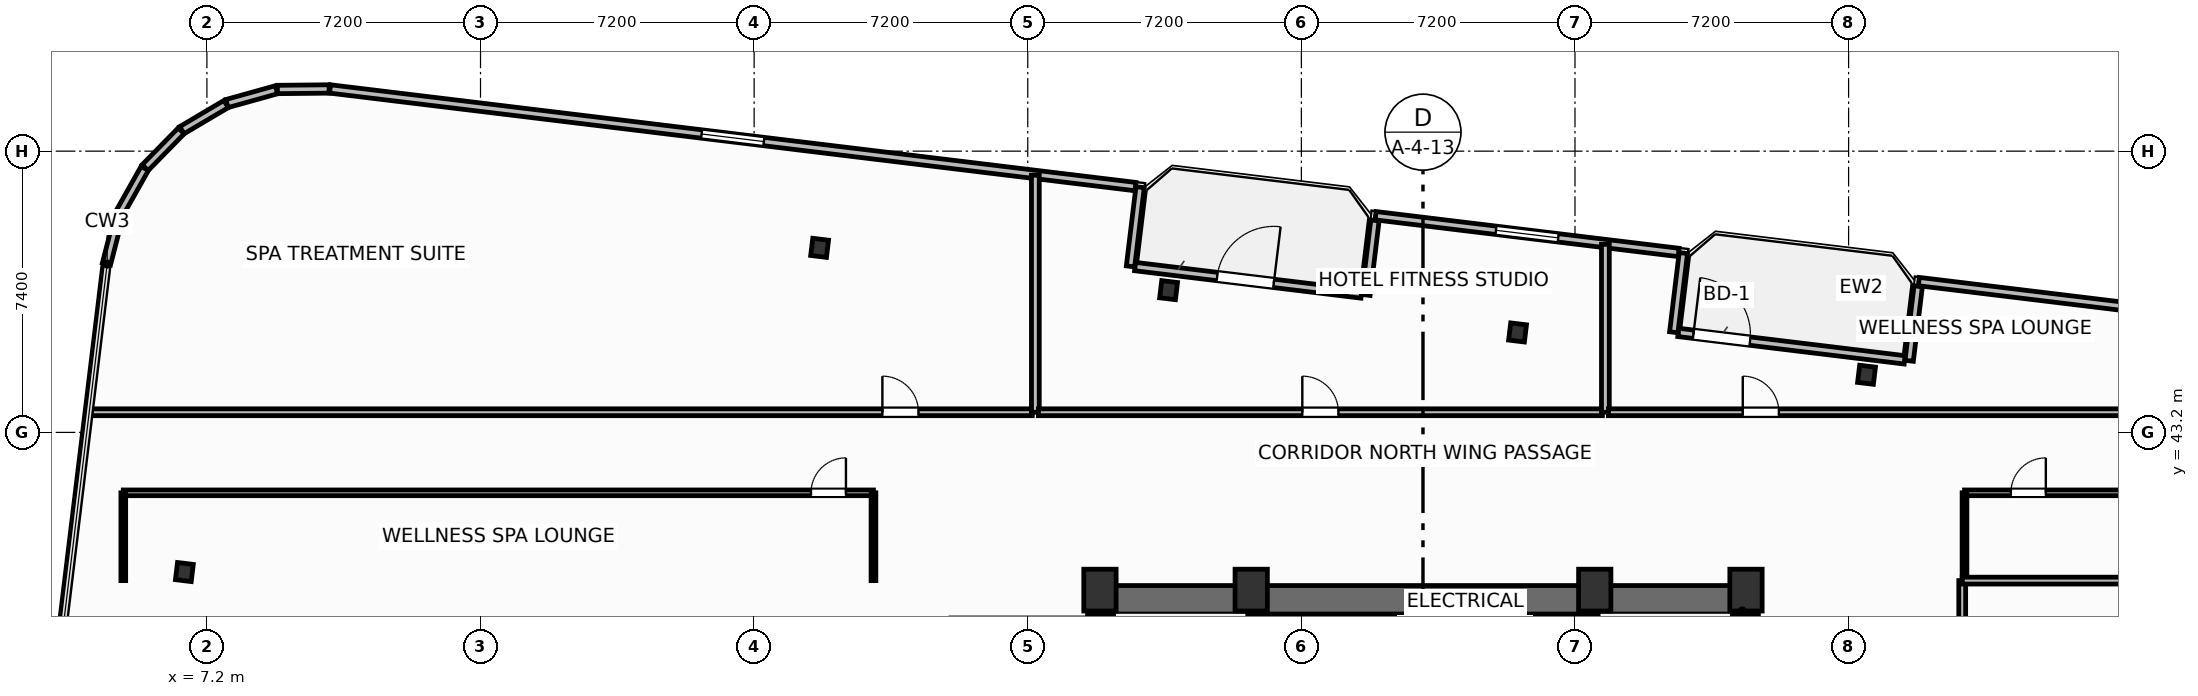
"""IFC4 building model, lengths in metres.
Left out: names, types, materials, properties, quantities, classifications, styles, units other than length and angle.
Written with IfcOpenShell. Run it as: python <this file> out.ifc"""

import sys

from ifc_helpers import new_model, si_unit, direction, frame, frame_2d, origin, origin_2d, place, context, subcontext, project, spatial, rectangle, i_section, extrude, element, fill, save


model = new_model("IFC4")
c1 = context("Model", 3, precision=1e-05, world=origin(), true_north=direction((0.0, 1.0)))
c2 = subcontext(c1, "Body", "Model", "MODEL_VIEW")
j1 = project(units=[si_unit("LENGTHUNIT", "METRE"), si_unit("PLANEANGLEUNIT", "RADIAN")], contexts=[c1])
p1 = place(None, origin())
s1 = spatial("IfcSite", under=j1, at=p1, CompositionType="ELEMENT")
p2 = place(p1, origin())
s2 = spatial("IfcBuilding", under=s1, at=p2, CompositionType="ELEMENT")
p3 = place(p2, frame((0.0, 0.0, 155.0)))
s3 = spatial("IfcBuildingStorey", under=s2, at=p3, CompositionType="ELEMENT", Elevation=155.0)
for number, where, z_axis, x_axis in (
    (1, (30.7, 39.05, 0.0), (0.0, 0.0, 1.0), (1.0, 0.0, 0.0)),
    (2, (34.68, 39.05, 0.0), (0.0, 0.0, 1.0), (1.0, 0.0, 0.0)),
    (3, (43.72, 39.05, 0.0), (0.0, 0.0, 1.0), (1.0, 0.0, 0.0)),
    (4, (47.7, 39.05, 0.0), (0.0, 0.0, 1.0), (1.0, 0.0, 0.0)),
):
    element("IfcColumn", number, at=place(p3, frame(where, z_axis=z_axis, x_axis=x_axis)), inside=s3, PredefinedType="COLUMN", context=c2, shape_type="SweptSolid", body=[
        extrude(rectangle(XDim=0.85, YDim=1.1, at=origin_2d()), origin(), (0.0, 0.0, 1.0), 3.7),
    ])
p4 = place(p3, frame((30.38, 38.795, 0.0), z_axis=(0.0, 0.0, 1.0), x_axis=(1.0, 0.0, 0.0)))
e5 = element("IfcWall", 5, at=p4, inside=s3, PredefinedType="SHEAR", context=c2, shape_type="SweptSolid", body=[
    extrude(rectangle(XDim=17.64, YDim=0.75, at=frame_2d((8.82, 0.0))), origin(), (0.0, 0.0, 1.0), 3.45),
])
for number, where, z_axis, x_axis in (
    (6, (30.755, 29.2, 0.0), (0.0, 0.0, 1.0), (0.0, 1.0, 0.0)),
    (7, (47.645, 29.2, 0.0), (0.0, 0.0, 1.0), (0.0, 1.0, 0.0)),
):
    element("IfcWall", number, at=place(p3, frame(where, z_axis=z_axis, x_axis=x_axis)), inside=s3, PredefinedType="SHEAR", context=c2, shape_type="SweptSolid", body=[
        extrude(rectangle(XDim=9.22, YDim=0.75, at=frame_2d((4.61, 0.0))), origin(), (0.0, 0.0, 1.0), 3.45),
    ])
p5 = place(p3, frame((34.64, 29.2, 0.0), z_axis=(0.0, 0.0, 1.0), x_axis=(0.0, 1.0, 0.0)))
e8 = element("IfcWall", 8, at=p5, inside=s3, PredefinedType="SHEAR", context=c2, shape_type="SweptSolid", body=[
    extrude(rectangle(XDim=9.22, YDim=0.25, at=frame_2d((4.61, 0.0))), origin(), (0.0, 0.0, 1.0), 3.45),
])
p6 = place(p5, frame((0.65, 0.0, 0.0)))
e9 = element("IfcOpeningElement", 9, at=p6, cuts=e8, PredefinedType="OPENING", context=c2, shape_type="SweptSolid", body=[
    extrude(rectangle(XDim=1.05, YDim=2.15, at=frame_2d((0.525, 1.075))), frame((0.0, 0.135, 0.0), z_axis=(0.0, -1.0, 0.0), x_axis=(1.0, 0.0, 0.0)), (0.0, 0.0, 1.0), 0.27),
])
p7 = place(p3, frame((43.76, 29.2, 0.0), z_axis=(0.0, 0.0, 1.0), x_axis=(0.0, 1.0, 0.0)))
e10 = element("IfcWall", 10, at=p7, inside=s3, PredefinedType="SHEAR", context=c2, shape_type="SweptSolid", body=[
    extrude(rectangle(XDim=9.22, YDim=0.25, at=frame_2d((4.61, 0.0))), origin(), (0.0, 0.0, 1.0), 3.45),
])
p8 = place(p7, frame((0.65, 0.0, 0.0)))
e11 = element("IfcOpeningElement", 11, at=p8, cuts=e10, PredefinedType="OPENING", context=c2, shape_type="SweptSolid", body=[
    extrude(rectangle(XDim=1.05, YDim=2.15, at=frame_2d((0.525, 1.075))), frame((0.0, 0.135, 0.0), z_axis=(0.0, -1.0, 0.0), x_axis=(1.0, 0.0, 0.0)), (0.0, 0.0, 1.0), 0.27),
])
for number, where, z_axis, x_axis in (
    (12, (50.872, 44.717, 0.0), (0.0, 0.0, 1.0), (0.993, -0.12, 0.0)),
    (13, (41.689, 45.83, 0.0), (0.0, 0.0, 1.0), (0.993, -0.12, 0.0)),
    (14, (32.506, 46.943, 0.0), (0.0, 0.0, 1.0), (0.993, -0.12, 0.0)),
    (15, (23.323, 48.056, 0.0), (0.0, 0.0, 1.0), (0.993, -0.12, 0.0)),
    (16, (6.607, 39.526, 0.0), (0.0, 0.0, 1.0), (0.993, -0.12, 0.0)),
):
    element("IfcColumn", number, at=place(p3, frame(where, z_axis=z_axis, x_axis=x_axis)), inside=s3, PredefinedType="COLUMN", context=c2, shape_type="SweptSolid", body=[
        extrude(i_section(OverallWidth=0.418, OverallDepth=0.455, WebThickness=0.042, FlangeThickness=0.068, FilletRadius=0.025, at=origin_2d()), origin(), (0.0, 0.0, 1.0), 3.7),
    ])
p9 = place(p3, frame((31.624, 47.563, 0.0), z_axis=(0.0, 0.0, 1.0), x_axis=(0.992729951822, -0.120362962556, 0.0)))
e17 = element("IfcWall", 17, at=p9, inside=s3, PredefinedType="SOLIDWALL", context=c2, shape_type="SweptSolid", body=[
    extrude(rectangle(XDim=6.0, YDim=0.22, at=frame_2d((3.0, 0.0))), origin(), (0.0, 0.0, 1.0), 2.73),
])
p10 = place(p9, frame((2.176, 0.0, 0.0)))
e18 = element("IfcOpeningElement", 18, at=p10, cuts=e17, PredefinedType="OPENING", context=c2, shape_type="SweptSolid", body=[
    extrude(rectangle(XDim=1.5, YDim=2.25, at=frame_2d((0.75, 1.125))), frame((0.0, 0.12, 0.0), z_axis=(0.0, -1.0, 0.0), x_axis=(1.0, 0.0, 0.0)), (0.0, 0.0, 1.0), 0.24),
])
p11 = place(p3, frame((45.92, 45.831, 0.0), z_axis=(0.0, 0.0, 1.0), x_axis=(0.992729951822, -0.120362962556, 0.0)))
e19 = element("IfcWall", 19, at=p11, inside=s3, PredefinedType="SOLIDWALL", context=c2, shape_type="SweptSolid", body=[
    extrude(rectangle(XDim=6.0, YDim=0.22, at=frame_2d((3.0, 0.0))), origin(), (0.0, 0.0, 1.0), 2.73),
])
p12 = place(p11, frame((0.4, 0.0, 0.0)))
e20 = element("IfcOpeningElement", 20, at=p12, cuts=e19, PredefinedType="OPENING", context=c2, shape_type="SweptSolid", body=[
    extrude(rectangle(XDim=1.5, YDim=2.25, at=frame_2d((0.75, 1.125))), frame((0.0, 0.12, 0.0), z_axis=(0.0, -1.0, 0.0), x_axis=(1.0, 0.0, 0.0)), (0.0, 0.0, 1.0), 0.24),
])
p13 = place(p3, frame((73.538, 44.588, 0.0), z_axis=(0.0, 0.0, 1.0), x_axis=(-0.992733493583, 0.120333747213, 0.0)))
e21 = element("IfcWall", 21, at=p13, inside=s3, PredefinedType="SOLIDWALL", context=c2, shape_type="SweptSolid", body=[
    extrude(rectangle(XDim=21.447, YDim=0.22, at=frame_2d((10.724, 0.0))), origin(), (0.0, 0.0, 1.0), 2.73),
])
p14 = place(p13, frame((9.899, 0.0, 0.8)))
e22 = element("IfcOpeningElement", 22, at=p14, cuts=e21, PredefinedType="OPENING", context=c2, shape_type="SweptSolid", body=[
    extrude(rectangle(XDim=1.65, YDim=1.65, at=frame_2d((0.825, 0.825))), frame((0.0, 0.12, 0.0), z_axis=(0.0, -1.0, 0.0), x_axis=(1.0, 0.0, 0.0)), (0.0, 0.0, 1.0), 0.24),
])
p15 = place(p3, frame((52.231, 47.045, 0.0), z_axis=(0.0, 0.0, 1.0), x_axis=(-0.120275992932, -0.992740492538, 0.0)))
e23 = element("IfcWall", 23, at=p15, inside=s3, PredefinedType="SOLIDWALL", context=c2, shape_type="SweptSolid", body=[
    extrude(rectangle(XDim=1.975, YDim=0.22, at=frame_2d((0.988, 0.0))), origin(), (0.0, 0.0, 1.0), 2.73),
])
p16 = place(p3, frame((45.799, 45.835, 0.0), z_axis=(0.0, 0.0, 1.0), x_axis=(0.120314009587, 0.992735885871, 0.0)))
e24 = element("IfcWall", 24, at=p16, inside=s3, PredefinedType="SOLIDWALL", context=c2, shape_type="SweptSolid", body=[
    extrude(rectangle(XDim=2.1, YDim=0.22, at=frame_2d((1.05, 0.0))), origin(), (0.0, 0.0, 1.0), 2.73),
])
p17 = place(p3, frame((45.928, 47.935, 0.0), z_axis=(0.0, 0.0, 1.0), x_axis=(-0.992730591876, 0.120357683402, 0.0)))
e25 = element("IfcWall", 25, at=p17, inside=s3, PredefinedType="SOLIDWALL", context=c2, shape_type="SweptSolid", body=[
    extrude(rectangle(XDim=8.035, YDim=0.22, at=frame_2d((4.017, 0.0))), origin(), (0.0, 0.0, 1.0), 2.73),
])
p18 = place(p17, frame((3.192, 0.0, 0.8)))
e26 = element("IfcOpeningElement", 26, at=p18, cuts=e25, PredefinedType="OPENING", context=c2, shape_type="SweptSolid", body=[
    extrude(rectangle(XDim=1.65, YDim=1.65, at=frame_2d((0.825, 0.825))), frame((0.0, 0.12, 0.0), z_axis=(0.0, -1.0, 0.0), x_axis=(1.0, 0.0, 0.0)), (0.0, 0.0, 1.0), 0.24),
])
p19 = place(p3, frame((37.936, 48.778, 0.0), z_axis=(0.0, 0.0, 1.0), x_axis=(-0.120397815541, -0.992725725472, 0.0)))
e27 = element("IfcWall", 27, at=p19, inside=s3, PredefinedType="SOLIDWALL", context=c2, shape_type="SweptSolid", body=[
    extrude(rectangle(XDim=1.975, YDim=0.22, at=frame_2d((0.988, 0.0))), origin(), (0.0, 0.0, 1.0), 2.73),
])
p20 = place(p3, frame((31.504, 47.568, 0.0), z_axis=(0.0, 0.0, 1.0), x_axis=(0.120341784665, 0.992732519294, 0.0)))
e28 = element("IfcWall", 28, at=p20, inside=s3, PredefinedType="SOLIDWALL", context=c2, shape_type="SweptSolid", body=[
    extrude(rectangle(XDim=2.1, YDim=0.22, at=frame_2d((1.05, 0.0))), origin(), (0.0, 0.0, 1.0), 2.73),
])
p21 = place(p3, frame((31.633, 49.668, 0.0), z_axis=(0.0, 0.0, 1.0), x_axis=(-0.992731670483, 0.120348786531, 0.0)))
e29 = element("IfcWall", 29, at=p21, inside=s3, PredefinedType="SOLIDWALL", context=c2, shape_type="SweptSolid", body=[
    extrude(rectangle(XDim=21.347, YDim=0.22, at=frame_2d((10.674, 0.0))), origin(), (0.0, 0.0, 1.0), 2.73),
])
p22 = place(p21, frame((9.849, 0.0, 0.8)))
e30 = element("IfcOpeningElement", 30, at=p22, cuts=e29, PredefinedType="OPENING", context=c2, shape_type="SweptSolid", body=[
    extrude(rectangle(XDim=1.65, YDim=1.65, at=frame_2d((0.825, 0.825))), frame((0.0, 0.12, 0.0), z_axis=(0.0, -1.0, 0.0), x_axis=(1.0, 0.0, 0.0)), (0.0, 0.0, 1.0), 0.24),
])
p23 = place(p3, frame((10.416, 52.237, 0.0), z_axis=(0.0, 0.0, 1.0), x_axis=(-0.999947718056, -0.010225514878, 0.0)))
e31 = element("IfcWall", 31, at=p23, inside=s3, PredefinedType="SOLIDWALL", context=c2, shape_type="SweptSolid", body=[
    extrude(rectangle(XDim=1.361, YDim=0.22, at=frame_2d((0.68, 0.0))), origin(), (0.0, 0.0, 1.0), 2.73),
])
for number, where, z_axis, x_axis in (
    (32, (9.031, 52.216, 0.0), (0.0, 0.0, 1.0), (-0.963, -0.269, 0.0)),
    (33, (7.706, 51.84, 0.0), (0.0, 0.0, 1.0), (-0.861, -0.509, 0.0)),
):
    element("IfcWall", number, at=place(p3, frame(where, z_axis=z_axis, x_axis=x_axis)), inside=s3, PredefinedType="SOLIDWALL", context=c2, shape_type="SweptSolid", body=[
        extrude(rectangle(XDim=1.353, YDim=0.22, at=frame_2d((0.677, 0.0))), origin(), (0.0, 0.0, 1.0), 2.73),
    ])
p24 = place(p3, frame((6.523, 51.133, 0.0), z_axis=(0.0, 0.0, 1.0), x_axis=(-0.699762925925, -0.714375144795, 0.0)))
e34 = element("IfcWall", 34, at=p24, inside=s3, PredefinedType="SOLIDWALL", context=c2, shape_type="SweptSolid", body=[
    extrude(rectangle(XDim=1.353, YDim=0.22, at=frame_2d((0.677, 0.0))), origin(), (0.0, 0.0, 1.0), 2.73),
])
p25 = place(p3, frame((5.564, 50.145, 0.0), z_axis=(0.0, 0.0, 1.0), x_axis=(-0.491117621399, -0.871093268227, 0.0)))
e35 = element("IfcWall", 35, at=p25, inside=s3, PredefinedType="SOLIDWALL", context=c2, shape_type="SweptSolid", body=[
    extrude(rectangle(XDim=1.353, YDim=0.22, at=frame_2d((0.677, 0.0))), origin(), (0.0, 0.0, 1.0), 2.73),
])
p26 = place(p3, frame((4.894, 48.942, 0.0), z_axis=(0.0, 0.0, 1.0), x_axis=(-0.248857256909, -0.968540172468, 0.0)))
e36 = element("IfcWall", 36, at=p26, inside=s3, PredefinedType="SOLIDWALL", context=c2, shape_type="SweptSolid", body=[
    extrude(rectangle(XDim=1.353, YDim=0.22, at=frame_2d((0.676, 0.0))), origin(), (0.0, 0.0, 1.0), 2.73),
])
p27 = place(p3, frame((5.0, 41.61, 0.0), z_axis=(0.0, 0.0, 1.0), x_axis=(1.0, 0.0, 0.0)))
e37 = element("IfcWall", 37, at=p27, inside=s3, PredefinedType="PARTITIONING", context=c2, shape_type="SweptSolid", body=[
    extrude(rectangle(XDim=19.74, YDim=0.15, at=frame_2d((9.87, 0.0))), origin(), (0.0, 0.0, 1.0), 3.45),
])
p28 = place(p27, frame((18.096, 0.0, 0.0)))
e38 = element("IfcOpeningElement", 38, at=p28, cuts=e37, PredefinedType="OPENING", context=c2, shape_type="SweptSolid", body=[
    extrude(rectangle(XDim=0.92, YDim=2.05, at=frame_2d((0.46, 1.025))), frame((0.0, 0.085, 0.0), z_axis=(0.0, -1.0, 0.0), x_axis=(1.0, 0.0, 0.0)), (0.0, 0.0, 1.0), 0.17),
])
for number, where, z_axis, x_axis in (
    (39, (5.0, 39.3, 0.0), (0.0, 0.0, 1.0), (0.0, 1.0, 0.0)),
    (40, (24.74, 39.3, 0.0), (0.0, 0.0, 1.0), (0.0, 1.0, 0.0)),
):
    element("IfcWall", number, at=place(p3, frame(where, z_axis=z_axis, x_axis=x_axis)), inside=s3, PredefinedType="PARTITIONING", context=c2, shape_type="SweptSolid", body=[
        extrude(rectangle(XDim=2.31, YDim=0.125, at=frame_2d((1.155, 0.0))), origin(), (0.0, 0.0, 1.0), 3.45),
    ])
p29 = place(p3, frame((53.45, 41.61, 0.0), z_axis=(0.0, 0.0, 1.0), x_axis=(1.0, 0.0, 0.0)))
e41 = element("IfcWall", 41, at=p29, inside=s3, PredefinedType="PARTITIONING", context=c2, shape_type="SweptSolid", body=[
    extrude(rectangle(XDim=16.55, YDim=0.15, at=frame_2d((8.275, 0.0))), origin(), (0.0, 0.0, 1.0), 2.972),
])
p30 = place(p29, frame((1.22, 0.0, 0.0)))
e42 = element("IfcOpeningElement", 42, at=p30, cuts=e41, PredefinedType="OPENING", context=c2, shape_type="SweptSolid", body=[
    extrude(rectangle(XDim=0.92, YDim=2.05, at=frame_2d((0.46, 1.025))), frame((0.0, 0.085, 0.0), z_axis=(0.0, -1.0, 0.0), x_axis=(1.0, 0.0, 0.0)), (0.0, 0.0, 1.0), 0.17),
])
p31 = place(p3, frame((53.45, 39.3, 0.0), z_axis=(0.0, 0.0, 1.0), x_axis=(0.0, 1.0, 0.0)))
e43 = element("IfcWall", 43, at=p31, inside=s3, PredefinedType="PARTITIONING", context=c2, shape_type="SweptSolid", body=[
    extrude(rectangle(XDim=2.31, YDim=0.125, at=frame_2d((1.155, 0.0))), origin(), (0.0, 0.0, 1.0), 3.45),
])
p32 = place(p3, frame((4.143, 43.73, 0.0), z_axis=(0.0, 0.0, 1.0), x_axis=(1.0, 0.0, 0.0)))
e44 = element("IfcWall", 44, at=p32, inside=s3, PredefinedType="PARTITIONING", context=c2, shape_type="SweptSolid", body=[
    extrude(rectangle(XDim=24.777, YDim=0.18, at=frame_2d((12.389, 0.0))), origin(), (0.0, 0.0, 1.0), 2.972),
])
p33 = place(p32, frame((20.832, 0.0, 0.0)))
e45 = element("IfcOpeningElement", 45, at=p33, cuts=e44, PredefinedType="OPENING", context=c2, shape_type="SweptSolid", body=[
    extrude(rectangle(XDim=0.95, YDim=2.05, at=frame_2d((0.475, 1.025))), frame((0.0, 0.1, 0.0), z_axis=(0.0, -1.0, 0.0), x_axis=(1.0, 0.0, 0.0)), (0.0, 0.0, 1.0), 0.2),
])
p34 = place(p3, frame((29.0, 43.73, 0.0), z_axis=(0.0, 0.0, 1.0), x_axis=(0.0, 1.0, 0.0)))
e46 = element("IfcWall", 46, at=p34, inside=s3, PredefinedType="PARTITIONING", context=c2, shape_type="SweptSolid", body=[
    extrude(rectangle(XDim=6.237, YDim=0.205, at=frame_2d((3.118, 0.0))), origin(), (0.0, 0.0, 1.0), 3.45),
])
p35 = place(p3, frame((29.08, 43.73, 0.0), z_axis=(0.0, 0.0, 1.0), x_axis=(1.0, 0.0, 0.0)))
e47 = element("IfcWall", 47, at=p35, inside=s3, PredefinedType="PARTITIONING", context=c2, shape_type="SweptSolid", body=[
    extrude(rectangle(XDim=14.84, YDim=0.18, at=frame_2d((7.42, 0.0))), origin(), (0.0, 0.0, 1.0), 2.972),
])
p36 = place(p35, frame((6.945, 0.0, 0.0)))
e48 = element("IfcOpeningElement", 48, at=p36, cuts=e47, PredefinedType="OPENING", context=c2, shape_type="SweptSolid", body=[
    extrude(rectangle(XDim=0.95, YDim=2.05, at=frame_2d((0.475, 1.025))), frame((0.0, 0.1, 0.0), z_axis=(0.0, -1.0, 0.0), x_axis=(1.0, 0.0, 0.0)), (0.0, 0.0, 1.0), 0.2),
])
p37 = place(p3, frame((44.0, 43.73, 0.0), z_axis=(0.0, 0.0, 1.0), x_axis=(0.0, 1.0, 0.0)))
e49 = element("IfcWall", 49, at=p37, inside=s3, PredefinedType="PARTITIONING", context=c2, shape_type="SweptSolid", body=[
    extrude(rectangle(XDim=4.418, YDim=0.205, at=frame_2d((2.209, 0.0))), origin(), (0.0, 0.0, 1.0), 3.45),
])
p38 = place(p3, frame((44.08, 43.73, 0.0), z_axis=(0.0, 0.0, 1.0), x_axis=(1.0, 0.0, 0.0)))
e50 = element("IfcWall", 50, at=p38, inside=s3, PredefinedType="PARTITIONING", context=c2, shape_type="SweptSolid", body=[
    extrude(rectangle(XDim=31.689, YDim=0.18, at=frame_2d((15.845, 0.0))), origin(), (0.0, 0.0, 1.0), 2.824),
])
p39 = place(p38, frame((3.535, 0.0, 0.0)))
e51 = element("IfcOpeningElement", 51, at=p39, cuts=e50, PredefinedType="OPENING", context=c2, shape_type="SweptSolid", body=[
    extrude(rectangle(XDim=0.95, YDim=2.05, at=frame_2d((0.475, 1.025))), frame((0.0, 0.1, 0.0), z_axis=(0.0, -1.0, 0.0), x_axis=(1.0, 0.0, 0.0)), (0.0, 0.0, 1.0), 0.2),
])
p40 = place(p3, frame((53.39, 19.24, 0.0), z_axis=(0.0, 0.0, 1.0), x_axis=(0.0, 1.0, 0.0)))
e52 = element("IfcWall", 52, at=p40, inside=s3, PredefinedType="PARTITIONING", context=c2, shape_type="SweptSolid", body=[
    extrude(rectangle(XDim=20.06, YDim=0.18, at=frame_2d((10.03, 0.0))), origin(), (0.0, 0.0, 1.0), 3.45),
])
p41 = place(p40, frame((7.7, 0.0, 0.0)))
e53 = element("IfcOpeningElement", 53, at=p41, cuts=e52, PredefinedType="OPENING", context=c2, shape_type="SweptSolid", body=[
    extrude(rectangle(XDim=0.95, YDim=2.05, at=frame_2d((0.475, 1.025))), frame((0.0, 0.1, 0.0), z_axis=(0.0, -1.0, 0.0), x_axis=(1.0, 0.0, 0.0)), (0.0, 0.0, 1.0), 0.2),
])
p42 = place(p3, frame((53.39, 39.3, 0.0), z_axis=(0.0, 0.0, 1.0), x_axis=(1.0, 0.0, 0.0)))
e54 = element("IfcWall", 54, at=p42, inside=s3, PredefinedType="PARTITIONING", context=c2, shape_type="SweptSolid", body=[
    extrude(rectangle(XDim=24.74, YDim=0.18, at=frame_2d((12.37, 0.0))), origin(), (0.0, 0.0, 1.0), 3.45),
])
p43 = place(p10, origin())
e55 = element("IfcDoor", 55, at=p43, inside=s3, OperationType="SINGLE_SWING_RIGHT", PredefinedType="DOOR", context=c2, shape_type="SweptSolid", body=[
    extrude(rectangle(XDim=1.5, YDim=2.25, at=frame_2d((0.75, 1.125))), frame((0.0, 0.025, 0.0), z_axis=(0.0, -1.0, 0.0), x_axis=(1.0, 0.0, 0.0)), (0.0, 0.0, 1.0), 0.05),
])
fill(e18, e55)
p44 = place(p12, origin())
e56 = element("IfcDoor", 56, at=p44, inside=s3, OperationType="SINGLE_SWING_LEFT", PredefinedType="DOOR", context=c2, shape_type="SweptSolid", body=[
    extrude(rectangle(XDim=1.5, YDim=2.25, at=frame_2d((0.75, 1.125))), frame((0.0, 0.025, 0.0), z_axis=(0.0, -1.0, 0.0), x_axis=(1.0, 0.0, 0.0)), (0.0, 0.0, 1.0), 0.05),
])
fill(e20, e56)
p45 = place(p18, origin())
e57 = element("IfcWindow", 57, at=p45, inside=s3, PartitioningType="SINGLE_PANEL", PredefinedType="WINDOW", context=c2, shape_type="SweptSolid", body=[
    extrude(rectangle(XDim=1.65, YDim=1.65, at=frame_2d((0.825, 0.825))), frame((0.0, 0.03, 0.0), z_axis=(0.0, -1.0, 0.0), x_axis=(1.0, 0.0, 0.0)), (0.0, 0.0, 1.0), 0.06),
])
fill(e26, e57)
p46 = place(p22, origin())
e58 = element("IfcWindow", 58, at=p46, inside=s3, PartitioningType="SINGLE_PANEL", PredefinedType="WINDOW", context=c2, shape_type="SweptSolid", body=[
    extrude(rectangle(XDim=1.65, YDim=1.65, at=frame_2d((0.825, 0.825))), frame((0.0, 0.03, 0.0), z_axis=(0.0, -1.0, 0.0), x_axis=(1.0, 0.0, 0.0)), (0.0, 0.0, 1.0), 0.06),
])
fill(e30, e58)
p47 = place(p28, origin())
e59 = element("IfcDoor", 59, at=p47, inside=s3, OperationType="SINGLE_SWING_RIGHT", PredefinedType="DOOR", context=c2, shape_type="SweptSolid", body=[
    extrude(rectangle(XDim=0.92, YDim=2.05, at=frame_2d((0.46, 1.025))), frame((0.0, 0.025, 0.0), z_axis=(0.0, -1.0, 0.0), x_axis=(1.0, 0.0, 0.0)), (0.0, 0.0, 1.0), 0.05),
])
fill(e38, e59)
p48 = place(p30, origin())
e60 = element("IfcDoor", 60, at=p48, inside=s3, OperationType="SINGLE_SWING_RIGHT", PredefinedType="DOOR", context=c2, shape_type="SweptSolid", body=[
    extrude(rectangle(XDim=0.92, YDim=2.05, at=frame_2d((0.46, 1.025))), frame((0.0, 0.025, 0.0), z_axis=(0.0, -1.0, 0.0), x_axis=(1.0, 0.0, 0.0)), (0.0, 0.0, 1.0), 0.05),
])
fill(e42, e60)
p49 = place(p33, origin())
e61 = element("IfcDoor", 61, at=p49, inside=s3, OperationType="SINGLE_SWING_LEFT", PredefinedType="DOOR", context=c2, shape_type="SweptSolid", body=[
    extrude(rectangle(XDim=0.95, YDim=2.05, at=frame_2d((0.475, 1.025))), frame((0.0, 0.025, 0.0), z_axis=(0.0, -1.0, 0.0), x_axis=(1.0, 0.0, 0.0)), (0.0, 0.0, 1.0), 0.05),
])
fill(e45, e61)
p50 = place(p36, origin())
e62 = element("IfcDoor", 62, at=p50, inside=s3, OperationType="SINGLE_SWING_LEFT", PredefinedType="DOOR", context=c2, shape_type="SweptSolid", body=[
    extrude(rectangle(XDim=0.95, YDim=2.05, at=frame_2d((0.475, 1.025))), frame((0.0, 0.025, 0.0), z_axis=(0.0, -1.0, 0.0), x_axis=(1.0, 0.0, 0.0)), (0.0, 0.0, 1.0), 0.05),
])
fill(e48, e62)
p51 = place(p39, origin())
e63 = element("IfcDoor", 63, at=p51, inside=s3, OperationType="SINGLE_SWING_LEFT", PredefinedType="DOOR", context=c2, shape_type="SweptSolid", body=[
    extrude(rectangle(XDim=0.95, YDim=2.05, at=frame_2d((0.475, 1.025))), frame((0.0, 0.025, 0.0), z_axis=(0.0, -1.0, 0.0), x_axis=(1.0, 0.0, 0.0)), (0.0, 0.0, 1.0), 0.05),
])
fill(e51, e63)
save(model, sys.argv[1])
